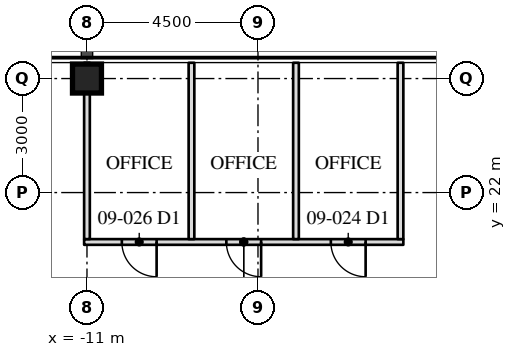
"""IFC4 building model, lengths in metres.
Left out: names, types, materials, properties, quantities, classifications, styles, units other than length and angle.
Written with IfcOpenShell. Run it as: python <this file> out.ifc"""

import sys

from ifc_helpers import new_model, si_unit, direction, frame, frame_2d, origin, origin_2d, place, context, subcontext, project, spatial, rectangle, hollow_rectangle, extrude, element, fill, save


model = new_model("IFC4")
c1 = context("Model", 3, precision=1e-05, world=origin(), true_north=direction((0.0, 1.0)))
c2 = subcontext(c1, "Body", "Model", "MODEL_VIEW")
j1 = project(units=[si_unit("LENGTHUNIT", "METRE"), si_unit("PLANEANGLEUNIT", "RADIAN")], contexts=[c1])
p1 = place(None, origin())
s1 = spatial("IfcSite", under=j1, at=p1, CompositionType="ELEMENT")
p2 = place(p1, origin())
s2 = spatial("IfcBuilding", under=s1, at=p2, CompositionType="ELEMENT")
p3 = place(p2, frame((0.0, 0.0, 40.6)))
s3 = spatial("IfcBuildingStorey", under=s2, at=p3, CompositionType="ELEMENT", Elevation=40.6)
p4 = place(p3, frame((-11.0, 25.0, 0.0), z_axis=(0.0, 0.0, 1.0), x_axis=(1.0, 0.0, 0.0)))
e1 = element("IfcColumn", 1, at=p4, inside=s3, PredefinedType="COLUMN", context=c2, shape_type="SweptSolid", body=[
    extrude(hollow_rectangle(XDim=0.762, YDim=0.762, WallThickness=0.127, at=origin_2d()), origin(), (0.0, 0.0, 1.0), 4.1),
])
p5 = place(p3, frame((-2.675, 20.7, 0.0), z_axis=(0.0, 0.0, 1.0), x_axis=(-1.0, 0.0, 0.0)))
e2 = element("IfcWall", 2, at=p5, inside=s3, PredefinedType="PARTITIONING", context=c2, shape_type="SweptSolid", body=[
    extrude(rectangle(XDim=8.4, YDim=0.15, at=frame_2d((4.2, 0.0))), origin(), (0.0, 0.0, 1.0), 3.91),
])
p6 = place(p5, frame((0.992, 0.0, 0.0)))
e3 = element("IfcOpeningElement", 3, at=p6, cuts=e2, PredefinedType="OPENING", context=c2, shape_type="SweptSolid", body=[
    extrude(rectangle(XDim=0.915, YDim=2.134, at=frame_2d((0.458, 1.067))), frame((0.0, 0.085, 0.0), z_axis=(0.0, -1.0, 0.0), x_axis=(1.0, 0.0, 0.0)), (0.0, 0.0, 1.0), 0.17),
])
p7 = place(p5, frame((3.742, 0.0, 0.0)))
e4 = element("IfcOpeningElement", 4, at=p7, cuts=e2, PredefinedType="OPENING", context=c2, shape_type="SweptSolid", body=[
    extrude(rectangle(XDim=0.915, YDim=2.134, at=frame_2d((0.458, 1.067))), frame((0.0, 0.085, 0.0), z_axis=(0.0, -1.0, 0.0), x_axis=(1.0, 0.0, 0.0)), (0.0, 0.0, 1.0), 0.17),
])
p8 = place(p5, frame((6.492, 0.0, 0.0)))
e5 = element("IfcOpeningElement", 5, at=p8, cuts=e2, PredefinedType="OPENING", context=c2, shape_type="SweptSolid", body=[
    extrude(rectangle(XDim=0.915, YDim=2.134, at=frame_2d((0.458, 1.067))), frame((0.0, 0.085, 0.0), z_axis=(0.0, -1.0, 0.0), x_axis=(1.0, 0.0, 0.0)), (0.0, 0.0, 1.0), 0.17),
])
for number, where, z_axis, x_axis in (
    (6, (-2.75, 20.775, 0.0), (0.0, 0.0, 1.0), (0.0, 1.0, 0.0)),
    (7, (-5.5, 20.775, 0.0), (0.0, 0.0, 1.0), (0.0, 1.0, 0.0)),
    (8, (-8.25, 20.775, 0.0), (0.0, 0.0, 1.0), (0.0, 1.0, 0.0)),
):
    element("IfcWall", number, at=place(p3, frame(where, z_axis=z_axis, x_axis=x_axis)), inside=s3, PredefinedType="PARTITIONING", context=c2, shape_type="SweptSolid", body=[
        extrude(rectangle(XDim=4.64, YDim=0.15, at=frame_2d((2.32, 0.0))), origin(), (0.0, 0.0, 1.0), 3.91),
    ])
p9 = place(p3, frame((-11.0, 20.775, 0.0), z_axis=(0.0, 0.0, 1.0), x_axis=(0.0, 1.0, 0.0)))
e9 = element("IfcWall", 9, at=p9, inside=s3, PredefinedType="PARTITIONING", context=c2, shape_type="SweptSolid", body=[
    extrude(rectangle(XDim=4.64, YDim=0.15, at=frame_2d((2.32, 0.0))), origin(), (0.0, 0.0, 1.0), 3.13),
])
p10 = place(p6, origin())
e10 = element("IfcDoor", 10, at=p10, inside=s3, OperationType="SINGLE_SWING_LEFT", PredefinedType="DOOR", context=c2, shape_type="SweptSolid", body=[
    extrude(rectangle(XDim=0.915, YDim=2.134, at=frame_2d((0.458, 1.067))), frame((0.0, 0.025, 0.0), z_axis=(0.0, -1.0, 0.0), x_axis=(1.0, 0.0, 0.0)), (0.0, 0.0, 1.0), 0.05),
])
fill(e3, e10)
p11 = place(p7, origin())
e11 = element("IfcDoor", 11, at=p11, inside=s3, OperationType="SINGLE_SWING_LEFT", PredefinedType="DOOR", context=c2, shape_type="SweptSolid", body=[
    extrude(rectangle(XDim=0.915, YDim=2.134, at=frame_2d((0.458, 1.067))), frame((0.0, 0.025, 0.0), z_axis=(0.0, -1.0, 0.0), x_axis=(1.0, 0.0, 0.0)), (0.0, 0.0, 1.0), 0.05),
])
fill(e4, e11)
p12 = place(p8, origin())
e12 = element("IfcDoor", 12, at=p12, inside=s3, OperationType="SINGLE_SWING_LEFT", PredefinedType="DOOR", context=c2, shape_type="SweptSolid", body=[
    extrude(rectangle(XDim=0.915, YDim=2.134, at=frame_2d((0.458, 1.067))), frame((0.0, 0.025, 0.0), z_axis=(0.0, -1.0, 0.0), x_axis=(1.0, 0.0, 0.0)), (0.0, 0.0, 1.0), 0.05),
])
fill(e5, e12)
save(model, sys.argv[1])
